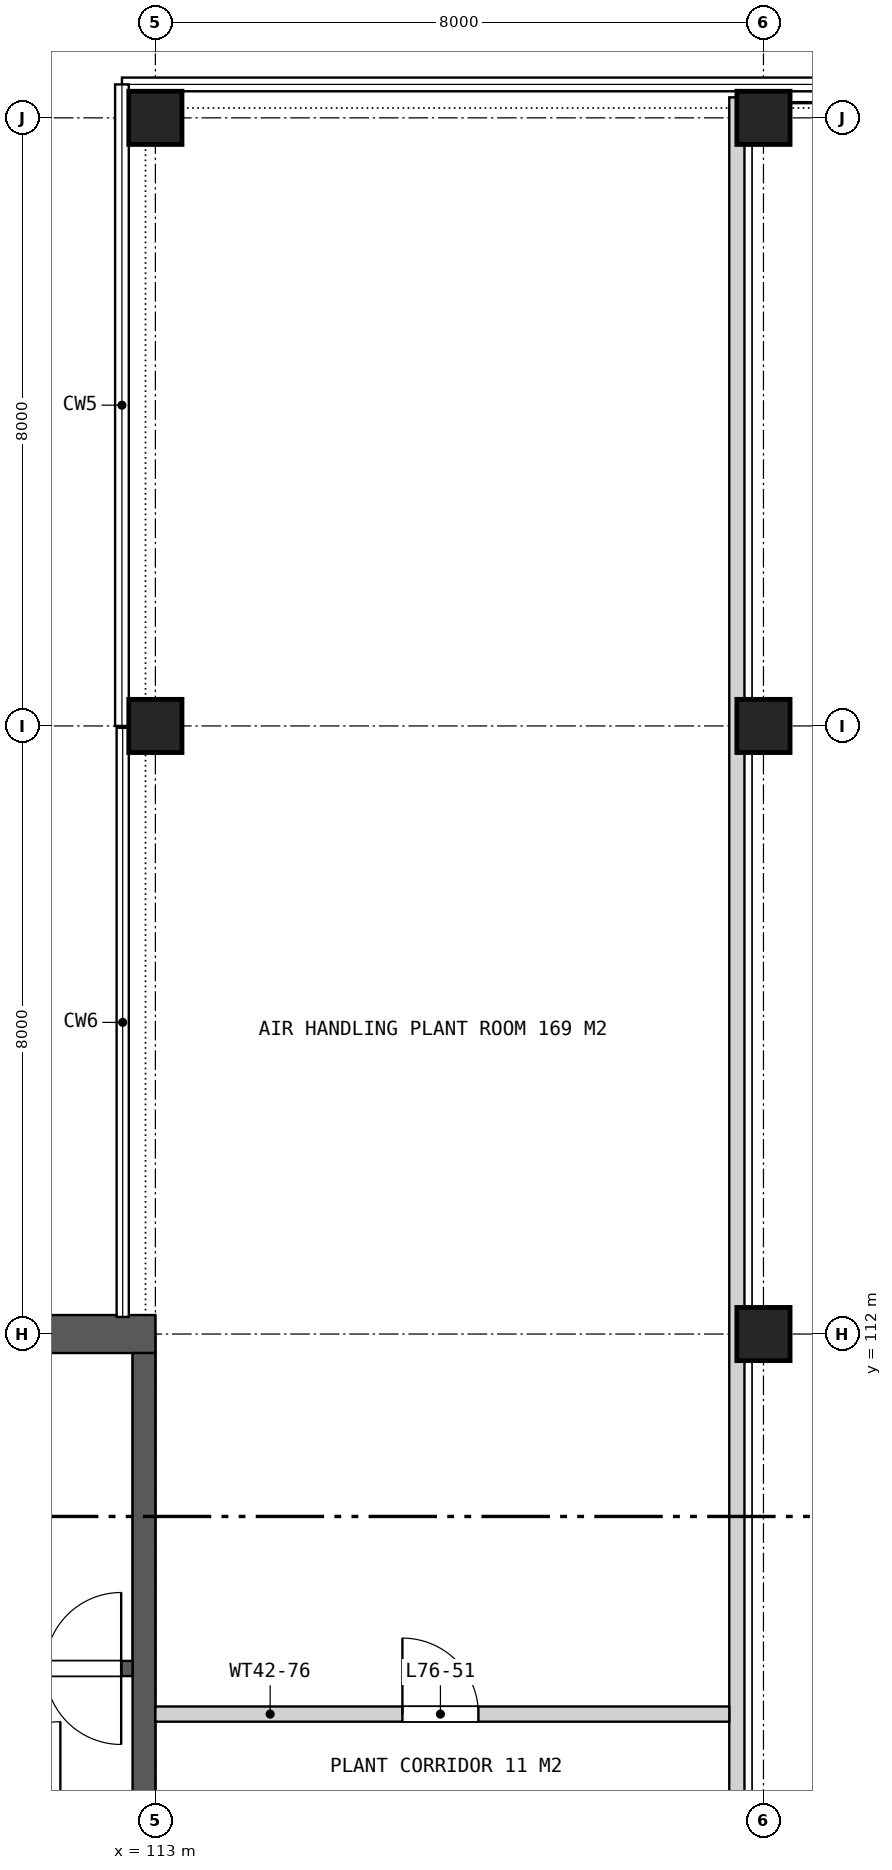
"""IFC4 building model, lengths in metres.
Left out: names, types, materials, properties, quantities, classifications, styles, units other than length and angle.
Written with IfcOpenShell. Run it as: python <this file> out.ifc"""

import sys

from ifc_helpers import new_model, si_unit, direction, frame, frame_2d, origin, origin_2d, place, context, subcontext, project, spatial, rectangle, extrude, element, fill, save


model = new_model("IFC4")
c1 = context("Model", 3, precision=1e-05, world=origin(), true_north=direction((0.0, 1.0)))
c2 = subcontext(c1, "Body", "Model", "MODEL_VIEW")
j1 = project(units=[si_unit("LENGTHUNIT", "METRE"), si_unit("PLANEANGLEUNIT", "RADIAN")], contexts=[c1])
p1 = place(None, origin())
s1 = spatial("IfcSite", under=j1, at=p1, CompositionType="ELEMENT")
p2 = place(p1, origin())
s2 = spatial("IfcBuilding", under=s1, at=p2, CompositionType="ELEMENT")
p3 = place(p2, frame((0.0, 0.0, 349.1)))
s3 = spatial("IfcBuildingStorey", under=s2, at=p3, CompositionType="ELEMENT", Elevation=349.1)
for number, where, z_axis, x_axis in (
    (1, (113.0, 120.0, 0.0), (0.0, 0.0, 1.0), (1.0, 0.0, 0.0)),
    (2, (113.0, 128.0, 0.0), (0.0, 0.0, 1.0), (1.0, 0.0, 0.0)),
    (3, (121.0, 112.0, 0.0), (0.0, 0.0, 1.0), (1.0, 0.0, 0.0)),
    (4, (121.0, 120.0, 0.0), (0.0, 0.0, 1.0), (1.0, 0.0, 0.0)),
    (5, (121.0, 128.0, 0.0), (0.0, 0.0, 1.0), (1.0, 0.0, 0.0)),
):
    element("IfcColumn", number, at=place(p3, frame(where, z_axis=z_axis, x_axis=x_axis)), inside=s3, PredefinedType="COLUMN", context=c2, shape_type="SweptSolid", body=[
        extrude(rectangle(XDim=0.7, YDim=0.7, at=origin_2d()), origin(), (0.0, 0.0, 1.0), 10.23),
    ])
p4 = place(p3, frame((113.0, 112.0, 0.0), z_axis=(0.0, 0.0, 1.0), x_axis=(-1.0, 0.0, 0.0)))
e6 = element("IfcWall", 6, at=p4, inside=s3, PredefinedType="SHEAR", context=c2, shape_type="SweptSolid", body=[
    extrude(rectangle(XDim=7.1, YDim=0.5, at=frame_2d((3.55, 0.0))), origin(), (0.0, 0.0, 1.0), 12.0),
])
p5 = place(p3, frame((112.85, 111.75, 0.0), z_axis=(0.0, 0.0, 1.0), x_axis=(0.0, -1.0, 0.0)))
e7 = element("IfcWall", 7, at=p5, inside=s3, PredefinedType="SHEAR", context=c2, shape_type="SweptSolid", body=[
    extrude(rectangle(XDim=6.05, YDim=0.3, at=frame_2d((3.025, 0.0))), origin(), (0.0, 0.0, 1.0), 12.0),
])
p6 = place(p3, frame((112.7, 107.6, 0.0), z_axis=(0.0, 0.0, 1.0), x_axis=(-1.0, 0.0, 0.0)))
e8 = element("IfcWall", 8, at=p6, inside=s3, PredefinedType="SHEAR", context=c2, shape_type="SweptSolid", body=[
    extrude(rectangle(XDim=6.8, YDim=0.2, at=frame_2d((3.4, 0.0))), origin(), (0.0, 0.0, 1.0), 11.6),
])
p7 = place(p6, frame((0.15, 0.0, 0.0)))
e9 = element("IfcOpeningElement", 9, at=p7, cuts=e8, PredefinedType="OPENING", context=c2, shape_type="SweptSolid", body=[
    extrude(rectangle(XDim=1.0, YDim=2.1, at=frame_2d((0.5, 1.05))), frame((0.0, 0.11, 0.0), z_axis=(0.0, -1.0, 0.0), x_axis=(1.0, 0.0, 0.0)), (0.0, 0.0, 1.0), 0.22),
])
p8 = place(p6, frame((0.15, 0.0, 9.2)))
e10 = element("IfcOpeningElement", 10, at=p8, cuts=e8, PredefinedType="OPENING", context=c2, shape_type="SweptSolid", body=[
    extrude(rectangle(XDim=1.0, YDim=2.1, at=frame_2d((0.5, 1.05))), frame((0.0, 0.11, 0.0), z_axis=(0.0, -1.0, 0.0), x_axis=(1.0, 0.0, 0.0)), (0.0, 0.0, 1.0), 0.22),
])
p9 = place(p3, frame((120.65, 71.73, 0.0), z_axis=(0.0, 0.0, 1.0), x_axis=(0.0, 1.0, 0.0)))
e11 = element("IfcWall", 11, at=p9, inside=s3, PredefinedType="SOLIDWALL", context=c2, shape_type="SweptSolid", body=[
    extrude(rectangle(XDim=56.54, YDim=0.2, at=frame_2d((28.27, 0.0))), origin(), (0.0, 0.0, 1.0), 11.6),
])
p10 = place(p9, frame((27.32, 0.0, 0.0)))
e12 = element("IfcOpeningElement", 12, at=p10, cuts=e11, PredefinedType="OPENING", context=c2, shape_type="SweptSolid", body=[
    extrude(rectangle(XDim=1.8, YDim=2.1, at=frame_2d((0.9, 1.05))), frame((0.0, 0.11, 0.0), z_axis=(0.0, -1.0, 0.0), x_axis=(1.0, 0.0, 0.0)), (0.0, 0.0, 1.0), 0.22),
])
p11 = place(p3, frame((113.0, 107.0, 0.0), z_axis=(0.0, 0.0, 1.0), x_axis=(1.0, 0.0, 0.0)))
e13 = element("IfcWall", 13, at=p11, inside=s3, PredefinedType="SOLIDWALL", context=c2, shape_type="SweptSolid", body=[
    extrude(rectangle(XDim=7.55, YDim=0.2, at=frame_2d((3.775, 0.0))), origin(), (0.0, 0.0, 1.0), 11.6),
])
p12 = place(p11, frame((3.25, 0.0, 0.0)))
e14 = element("IfcOpeningElement", 14, at=p12, cuts=e13, PredefinedType="OPENING", context=c2, shape_type="SweptSolid", body=[
    extrude(rectangle(XDim=1.0, YDim=2.1, at=frame_2d((0.5, 1.05))), frame((0.0, 0.11, 0.0), z_axis=(0.0, -1.0, 0.0), x_axis=(1.0, 0.0, 0.0)), (0.0, 0.0, 1.0), 0.22),
])
p13 = place(p7, frame((1.0, 0.0, 0.0), z_axis=(0.0, 0.0, 1.0), x_axis=(-1.0, 0.0, 0.0)))
e15 = element("IfcDoor", 15, at=p13, inside=s3, OperationType="SINGLE_SWING_RIGHT", PredefinedType="DOOR", context=c2, shape_type="SweptSolid", body=[
    extrude(rectangle(XDim=1.0, YDim=2.1, at=frame_2d((0.5, 1.05))), frame((0.0, 0.025, 0.0), z_axis=(0.0, -1.0, 0.0), x_axis=(1.0, 0.0, 0.0)), (0.0, 0.0, 1.0), 0.05),
])
fill(e9, e15)
p14 = place(p8, origin())
e16 = element("IfcDoor", 16, at=p14, inside=s3, OperationType="SINGLE_SWING_LEFT", PredefinedType="DOOR", context=c2, shape_type="SweptSolid", body=[
    extrude(rectangle(XDim=1.0, YDim=2.1, at=frame_2d((0.5, 1.05))), frame((0.0, 0.025, 0.0), z_axis=(0.0, -1.0, 0.0), x_axis=(1.0, 0.0, 0.0)), (0.0, 0.0, 1.0), 0.05),
])
fill(e10, e16)
p15 = place(p12, origin())
e17 = element("IfcDoor", 17, at=p15, inside=s3, OperationType="SINGLE_SWING_LEFT", PredefinedType="DOOR", context=c2, shape_type="SweptSolid", body=[
    extrude(rectangle(XDim=1.0, YDim=2.1, at=frame_2d((0.5, 1.05))), frame((0.0, 0.025, 0.0), z_axis=(0.0, -1.0, 0.0), x_axis=(1.0, 0.0, 0.0)), (0.0, 0.0, 1.0), 0.05),
])
fill(e14, e17)
save(model, sys.argv[1])
